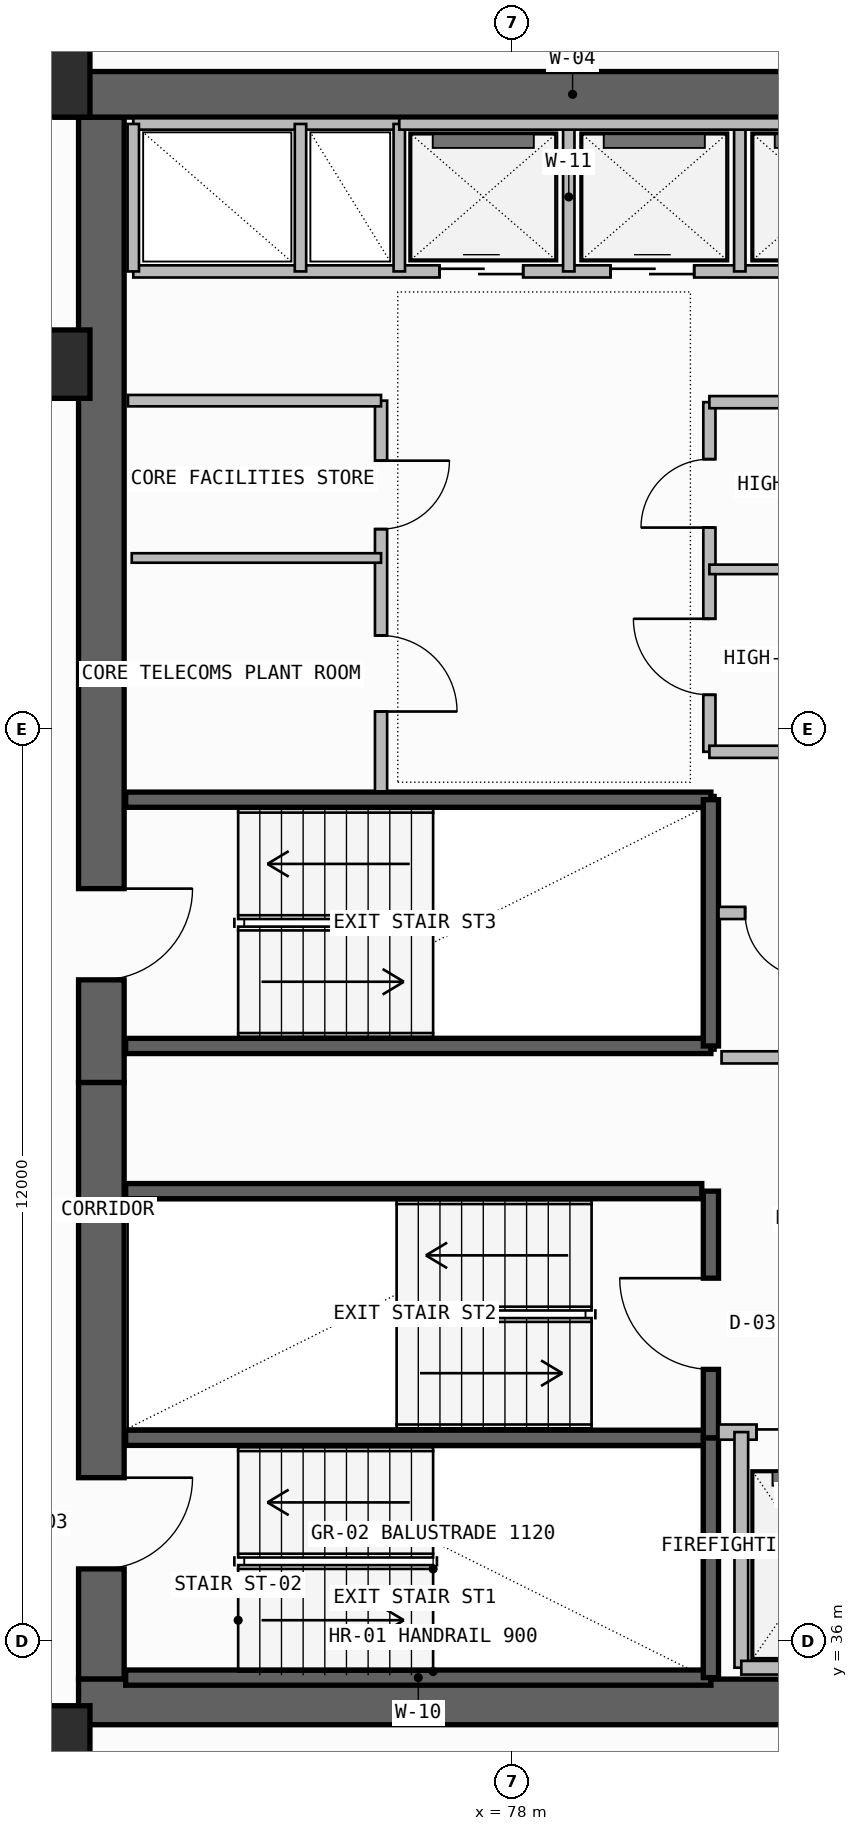
"""IFC4 building model, lengths in metres.
Left out: names, types, materials, properties, quantities, classifications, styles, units other than length and angle.
Written with IfcOpenShell. Run it as: python <this file> out.ifc"""

import sys

from ifc_helpers import new_model, si_unit, direction, frame, frame_2d, origin, origin_2d, place, context, subcontext, project, spatial, rectangle, extrude, element, fill, save


model = new_model("IFC4")
c1 = context("Model", 3, precision=1e-05, world=origin(), true_north=direction((0.0, 1.0)))
c2 = subcontext(c1, "Body", "Model", "MODEL_VIEW")
j1 = project(units=[si_unit("LENGTHUNIT", "METRE"), si_unit("PLANEANGLEUNIT", "RADIAN")], contexts=[c1])
p1 = place(None, origin())
s1 = spatial("IfcSite", under=j1, at=p1, CompositionType="ELEMENT")
p2 = place(p1, origin())
s2 = spatial("IfcBuilding", under=s1, at=p2, CompositionType="ELEMENT")
p3 = place(p2, frame((0.0, 0.0, 246.66)))
s3 = spatial("IfcBuildingStorey", under=s2, at=p3, CompositionType="ELEMENT", Elevation=246.66)
p4 = place(p3, frame((72.6, 35.5, -0.26), z_axis=(0.0, 0.0, 1.0), x_axis=(0.0, 1.0, 0.0)))
e1 = element("IfcWall", 1, at=p4, inside=s3, PredefinedType="SHEAR", context=c2, shape_type="SweptSolid", body=[
    extrude(rectangle(XDim=7.85, YDim=0.6, at=frame_2d((3.925, 0.0))), origin(), (0.0, 0.0, 1.0), 3.52),
])
p5 = place(p4, frame((1.45, 0.0, 0.26)))
e2 = element("IfcOpeningElement", 2, at=p5, cuts=e1, PredefinedType="OPENING", context=c2, shape_type="SweptSolid", body=[
    extrude(rectangle(XDim=1.2, YDim=2.2, at=frame_2d((0.6, 1.1))), frame((0.0, 0.31, 0.0), z_axis=(0.0, -1.0, 0.0), x_axis=(1.0, 0.0, 0.0)), (0.0, 0.0, 1.0), 0.62),
])
p6 = place(p3, frame((72.3, 35.2, -0.26), z_axis=(0.0, 0.0, 1.0), x_axis=(1.0, 0.0, 0.0)))
e3 = element("IfcWall", 3, at=p6, inside=s3, PredefinedType="SHEAR", context=c2, shape_type="SweptSolid", body=[
    extrude(rectangle(XDim=13.3, YDim=0.6, at=frame_2d((6.65, 0.0))), origin(), (0.0, 0.0, 1.0), 3.52),
])
p7 = place(p3, frame((72.6, 43.35, -0.26), z_axis=(0.0, 0.0, 1.0), x_axis=(0.0, 1.0, 0.0)))
e4 = element("IfcWall", 4, at=p7, inside=s3, PredefinedType="SHEAR", context=c2, shape_type="SweptSolid", body=[
    extrude(rectangle(XDim=12.7, YDim=0.6, at=frame_2d((6.35, 0.0))), origin(), (0.0, 0.0, 1.0), 3.52),
])
p8 = place(p7, frame((1.35, 0.0, 0.26)))
e5 = element("IfcOpeningElement", 5, at=p8, cuts=e4, PredefinedType="OPENING", context=c2, shape_type="SweptSolid", body=[
    extrude(rectangle(XDim=1.2, YDim=2.2, at=frame_2d((0.6, 1.1))), frame((0.0, 0.31, 0.0), z_axis=(0.0, -1.0, 0.0), x_axis=(1.0, 0.0, 0.0)), (0.0, 0.0, 1.0), 0.62),
])
p9 = place(p3, frame((72.0, 56.35, -0.26), z_axis=(0.0, 0.0, 1.0), x_axis=(1.0, 0.0, 0.0)))
e6 = element("IfcWall", 6, at=p9, inside=s3, PredefinedType="SHEAR", context=c2, shape_type="SweptSolid", body=[
    extrude(rectangle(XDim=13.6, YDim=0.6, at=frame_2d((6.8, 0.0))), origin(), (0.0, 0.0, 1.0), 3.52),
])
for number, where, z_axis, x_axis in (
    (7, (72.0, 34.7, 0.0), (0.0, 0.0, 1.0), (1.0, 0.0, 0.0)),
    (8, (72.0, 52.8, 0.0), (0.0, 0.0, 1.0), (1.0, 0.0, 0.0)),
    (9, (72.0, 56.5, 0.0), (0.0, 0.0, 1.0), (1.0, 0.0, 0.0)),
):
    element("IfcColumn", number, at=place(p3, frame(where, z_axis=z_axis, x_axis=x_axis)), inside=s3, PredefinedType="COLUMN", context=c2, shape_type="SweptSolid", body=[
        extrude(rectangle(XDim=0.9, YDim=0.9, at=origin_2d()), origin(), (0.0, 0.0, 1.0), 3.52),
    ])
for number, where, z_axis, x_axis in (
    (10, (72.92, 35.52, -0.26), (0.0, 0.0, 1.0), (1.0, 0.0, 0.0)),
    (11, (72.92, 38.675, -0.26), (0.0, 0.0, 1.0), (1.0, 0.0, 0.0)),
):
    element("IfcWall", number, at=place(p3, frame(where, z_axis=z_axis, x_axis=x_axis)), inside=s3, PredefinedType="SOLIDWALL", context=c2, shape_type="SweptSolid", body=[
        extrude(rectangle(XDim=7.7, YDim=0.2, at=frame_2d((3.85, 0.0))), origin(), (0.0, 0.0, 1.0), 3.52),
    ])
p10 = place(p3, frame((80.62, 35.52, -0.26), z_axis=(0.0, 0.0, 1.0), x_axis=(0.0, 1.0, 0.0)))
e12 = element("IfcWall", 12, at=p10, inside=s3, PredefinedType="SOLIDWALL", context=c2, shape_type="SweptSolid", body=[
    extrude(rectangle(XDim=3.155, YDim=0.2, at=frame_2d((1.578, 0.0))), origin(), (0.0, 0.0, 1.0), 3.52),
])
p11 = place(p3, frame((80.62, 38.675, -0.26), z_axis=(0.0, 0.0, 1.0), x_axis=(0.0, 1.0, 0.0)))
e13 = element("IfcWall", 13, at=p11, inside=s3, PredefinedType="SOLIDWALL", context=c2, shape_type="SweptSolid", body=[
    extrude(rectangle(XDim=3.245, YDim=0.2, at=frame_2d((1.623, 0.0))), origin(), (0.0, 0.0, 1.0), 3.52),
])
p12 = place(p11, frame((0.9, 0.0, 0.26)))
e14 = element("IfcOpeningElement", 14, at=p12, cuts=e13, PredefinedType="OPENING", context=c2, shape_type="SweptSolid", body=[
    extrude(rectangle(XDim=1.2, YDim=2.2, at=frame_2d((0.6, 1.1))), frame((0.0, 0.11, 0.0), z_axis=(0.0, -1.0, 0.0), x_axis=(1.0, 0.0, 0.0)), (0.0, 0.0, 1.0), 0.22),
])
p13 = place(p3, frame((80.72, 38.75, 0.0), z_axis=(0.0, 0.0, 1.0), x_axis=(1.0, 0.0, 0.0)))
e15 = element("IfcWall", 15, at=p13, inside=s3, PredefinedType="SOLIDWALL", context=c2, shape_type="SweptSolid", body=[
    extrude(rectangle(XDim=4.26, YDim=0.2, at=frame_2d((2.13, 0.0))), origin(), (0.0, 0.0, 1.0), 3.26),
])
p14 = place(p13, frame((0.5, 0.0, 0.0)))
e16 = element("IfcOpeningElement", 16, at=p14, cuts=e15, PredefinedType="OPENING", context=c2, shape_type="SweptSolid", body=[
    extrude(rectangle(XDim=1.3, YDim=2.3, at=frame_2d((0.65, 1.15))), frame((0.0, 0.11, 0.0), z_axis=(0.0, -1.0, 0.0), x_axis=(1.0, 0.0, 0.0)), (0.0, 0.0, 1.0), 0.22),
])
p15 = place(p13, frame((2.45, 0.0, 0.0)))
e17 = element("IfcOpeningElement", 17, at=p15, cuts=e15, PredefinedType="OPENING", context=c2, shape_type="SweptSolid", body=[
    extrude(rectangle(XDim=1.3, YDim=2.3, at=frame_2d((0.65, 1.15))), frame((0.0, 0.11, 0.0), z_axis=(0.0, -1.0, 0.0), x_axis=(1.0, 0.0, 0.0)), (0.0, 0.0, 1.0), 0.22),
])
p16 = place(p3, frame((81.02, 35.65, 0.0), z_axis=(0.0, 0.0, 1.0), x_axis=(0.0, 1.0, 0.0)))
e18 = element("IfcWall", 18, at=p16, inside=s3, PredefinedType="SOLIDWALL", context=c2, shape_type="SweptSolid", body=[
    extrude(rectangle(XDim=3.1, YDim=0.18, at=frame_2d((1.55, 0.0))), origin(), (0.0, 0.0, 1.0), 3.26),
])
p17 = place(p3, frame((81.02, 35.65, 0.0), z_axis=(0.0, 0.0, 1.0), x_axis=(1.0, 0.0, 0.0)))
e19 = element("IfcWall", 19, at=p17, inside=s3, PredefinedType="SOLIDWALL", context=c2, shape_type="SweptSolid", body=[
    extrude(rectangle(XDim=3.93, YDim=0.18, at=frame_2d((1.965, 0.0))), origin(), (0.0, 0.0, 1.0), 3.26),
])
p18 = place(p3, frame((72.92, 41.92, -0.26), z_axis=(0.0, 0.0, 1.0), x_axis=(1.0, 0.0, 0.0)))
e20 = element("IfcWall", 20, at=p18, inside=s3, PredefinedType="SOLIDWALL", context=c2, shape_type="SweptSolid", body=[
    extrude(rectangle(XDim=7.58, YDim=0.2, at=frame_2d((3.79, 0.0))), origin(), (0.0, 0.0, 1.0), 3.52),
])
for number, where, z_axis, x_axis in (
    (21, (72.92, 43.83, -0.26), (0.0, 0.0, 1.0), (1.0, 0.0, 0.0)),
    (22, (72.92, 47.07, -0.26), (0.0, 0.0, 1.0), (1.0, 0.0, 0.0)),
):
    element("IfcWall", number, at=place(p3, frame(where, z_axis=z_axis, x_axis=x_axis)), inside=s3, PredefinedType="SOLIDWALL", context=c2, shape_type="SweptSolid", body=[
        extrude(rectangle(XDim=7.7, YDim=0.2, at=frame_2d((3.85, 0.0))), origin(), (0.0, 0.0, 1.0), 3.52),
    ])
p19 = place(p3, frame((80.62, 43.83, -0.26), z_axis=(0.0, 0.0, 1.0), x_axis=(0.0, 1.0, 0.0)))
e23 = element("IfcWall", 23, at=p19, inside=s3, PredefinedType="SOLIDWALL", context=c2, shape_type="SweptSolid", body=[
    extrude(rectangle(XDim=3.24, YDim=0.2, at=frame_2d((1.62, 0.0))), origin(), (0.0, 0.0, 1.0), 3.52),
])
p20 = place(p3, frame((80.72, 45.58, 0.0), z_axis=(0.0, 0.0, 1.0), x_axis=(1.0, 0.0, 0.0)))
e24 = element("IfcWall", 24, at=p20, inside=s3, PredefinedType="PLUMBINGWALL", context=c2, shape_type="SweptSolid", body=[
    extrude(rectangle(XDim=4.23, YDim=0.16, at=frame_2d((2.115, 0.0))), origin(), (0.0, 0.0, 1.0), 3.26),
])
p21 = place(p20, frame((0.35, 0.0, 0.0)))
e25 = element("IfcOpeningElement", 25, at=p21, cuts=e24, PredefinedType="OPENING", context=c2, shape_type="SweptSolid", body=[
    extrude(rectangle(XDim=0.85, YDim=2.05, at=frame_2d((0.425, 1.025))), frame((0.0, 0.09, 0.0), z_axis=(0.0, -1.0, 0.0), x_axis=(1.0, 0.0, 0.0)), (0.0, 0.0, 1.0), 0.18),
])
p22 = place(p20, frame((2.35, 0.0, 0.0)))
e26 = element("IfcOpeningElement", 26, at=p22, cuts=e24, PredefinedType="OPENING", context=c2, shape_type="SweptSolid", body=[
    extrude(rectangle(XDim=0.9, YDim=2.1, at=frame_2d((0.45, 1.05))), frame((0.0, 0.09, 0.0), z_axis=(0.0, -1.0, 0.0), x_axis=(1.0, 0.0, 0.0)), (0.0, 0.0, 1.0), 0.18),
])
p23 = place(p3, frame((80.76, 43.68, 0.0), z_axis=(0.0, 0.0, 1.0), x_axis=(1.0, 0.0, 0.0)))
e27 = element("IfcWall", 27, at=p23, inside=s3, PredefinedType="PLUMBINGWALL", context=c2, shape_type="SweptSolid", body=[
    extrude(rectangle(XDim=4.19, YDim=0.16, at=frame_2d((2.095, 0.0))), origin(), (0.0, 0.0, 1.0), 3.26),
])
p24 = place(p3, frame((76.28, 47.18, 0.0), z_axis=(0.0, 0.0, 1.0), x_axis=(0.0, 1.0, 0.0)))
e28 = element("IfcWall", 28, at=p24, inside=s3, PredefinedType="SOLIDWALL", context=c2, shape_type="SweptSolid", body=[
    extrude(rectangle(XDim=5.14, YDim=0.16, at=frame_2d((2.57, 0.0))), origin(), (0.0, 0.0, 1.0), 3.26),
])
p25 = place(p24, frame((1.05, 0.0, 0.0)))
e29 = element("IfcOpeningElement", 29, at=p25, cuts=e28, PredefinedType="OPENING", context=c2, shape_type="SweptSolid", body=[
    extrude(rectangle(XDim=1.0, YDim=2.2, at=frame_2d((0.5, 1.1))), frame((0.0, 0.09, 0.0), z_axis=(0.0, -1.0, 0.0), x_axis=(1.0, 0.0, 0.0)), (0.0, 0.0, 1.0), 0.18),
])
p26 = place(p24, frame((3.45, 0.0, 0.0)))
e30 = element("IfcOpeningElement", 30, at=p26, cuts=e28, PredefinedType="OPENING", context=c2, shape_type="SweptSolid", body=[
    extrude(rectangle(XDim=0.9, YDim=2.1, at=frame_2d((0.45, 1.05))), frame((0.0, 0.09, 0.0), z_axis=(0.0, -1.0, 0.0), x_axis=(1.0, 0.0, 0.0)), (0.0, 0.0, 1.0), 0.18),
])
p27 = place(p3, frame((72.95, 52.32, 0.0), z_axis=(0.0, 0.0, 1.0), x_axis=(1.0, 0.0, 0.0)))
e31 = element("IfcWall", 31, at=p27, inside=s3, PredefinedType="SOLIDWALL", context=c2, shape_type="SweptSolid", body=[
    extrude(rectangle(XDim=3.33, YDim=0.15, at=frame_2d((1.665, 0.0))), origin(), (0.0, 0.0, 1.0), 3.26),
])
p28 = place(p3, frame((73.0, 50.25, 0.0), z_axis=(0.0, 0.0, 1.0), x_axis=(1.0, 0.0, 0.0)))
e32 = element("IfcWall", 32, at=p28, inside=s3, PredefinedType="PARTITIONING", context=c2, shape_type="SweptSolid", body=[
    extrude(rectangle(XDim=3.28, YDim=0.125, at=frame_2d((1.64, 0.0))), origin(), (0.0, 0.0, 1.0), 3.26),
])
p29 = place(p3, frame((80.6, 47.7, 0.0), z_axis=(0.0, 0.0, 1.0), x_axis=(0.0, 1.0, 0.0)))
e33 = element("IfcWall", 33, at=p29, inside=s3, PredefinedType="SOLIDWALL", context=c2, shape_type="SweptSolid", body=[
    extrude(rectangle(XDim=4.6, YDim=0.16, at=frame_2d((2.3, 0.0))), origin(), (0.0, 0.0, 1.0), 3.26),
])
p30 = place(p29, frame((0.75, 0.0, 0.0)))
e34 = element("IfcOpeningElement", 34, at=p30, cuts=e33, PredefinedType="OPENING", context=c2, shape_type="SweptSolid", body=[
    extrude(rectangle(XDim=1.0, YDim=2.2, at=frame_2d((0.5, 1.1))), frame((0.0, 0.09, 0.0), z_axis=(0.0, -1.0, 0.0), x_axis=(1.0, 0.0, 0.0)), (0.0, 0.0, 1.0), 0.18),
])
p31 = place(p29, frame((2.95, 0.0, 0.0)))
e35 = element("IfcOpeningElement", 35, at=p31, cuts=e33, PredefinedType="OPENING", context=c2, shape_type="SweptSolid", body=[
    extrude(rectangle(XDim=0.9, YDim=2.1, at=frame_2d((0.45, 1.05))), frame((0.0, 0.09, 0.0), z_axis=(0.0, -1.0, 0.0), x_axis=(1.0, 0.0, 0.0)), (0.0, 0.0, 1.0), 0.18),
])
p32 = place(p3, frame((80.6, 47.7, 0.0), z_axis=(0.0, 0.0, 1.0), x_axis=(1.0, 0.0, 0.0)))
e36 = element("IfcWall", 36, at=p32, inside=s3, PredefinedType="SOLIDWALL", context=c2, shape_type="SweptSolid", body=[
    extrude(rectangle(XDim=4.4, YDim=0.16, at=frame_2d((2.2, 0.0))), origin(), (0.0, 0.0, 1.0), 3.26),
])
p33 = place(p3, frame((80.6, 52.3, 0.0), z_axis=(0.0, 0.0, 1.0), x_axis=(1.0, 0.0, 0.0)))
e37 = element("IfcWall", 37, at=p33, inside=s3, PredefinedType="SOLIDWALL", context=c2, shape_type="SweptSolid", body=[
    extrude(rectangle(XDim=4.22, YDim=0.16, at=frame_2d((2.11, 0.0))), origin(), (0.0, 0.0, 1.0), 3.26),
])
p34 = place(p3, frame((80.6, 50.1, 0.0), z_axis=(0.0, 0.0, 1.0), x_axis=(1.0, 0.0, 0.0)))
e38 = element("IfcWall", 38, at=p34, inside=s3, PredefinedType="PARTITIONING", context=c2, shape_type="SweptSolid", body=[
    extrude(rectangle(XDim=4.22, YDim=0.125, at=frame_2d((2.11, 0.0))), origin(), (0.0, 0.0, 1.0), 3.26),
])
p35 = place(p3, frame((73.02, 54.02, 0.0), z_axis=(0.0, 0.0, 1.0), x_axis=(1.0, 0.0, 0.0)))
e39 = element("IfcWall", 39, at=p35, inside=s3, PredefinedType="SOLIDWALL", context=c2, shape_type="SweptSolid", body=[
    extrude(rectangle(XDim=12.08, YDim=0.16, at=frame_2d((6.04, 0.0))), origin(), (0.0, 0.0, 1.0), 3.26),
])
p36 = place(p35, frame((4.03, 0.0, 0.0)))
e40 = element("IfcOpeningElement", 40, at=p36, cuts=e39, PredefinedType="OPENING", context=c2, shape_type="SweptSolid", body=[
    extrude(rectangle(XDim=1.1, YDim=2.25, at=frame_2d((0.55, 1.125))), frame((0.0, 0.09, 0.0), z_axis=(0.0, -1.0, 0.0), x_axis=(1.0, 0.0, 0.0)), (0.0, 0.0, 1.0), 0.18),
])
p37 = place(p35, frame((6.28, 0.0, 0.0)))
e41 = element("IfcOpeningElement", 41, at=p37, cuts=e39, PredefinedType="OPENING", context=c2, shape_type="SweptSolid", body=[
    extrude(rectangle(XDim=1.1, YDim=2.25, at=frame_2d((0.55, 1.125))), frame((0.0, 0.09, 0.0), z_axis=(0.0, -1.0, 0.0), x_axis=(1.0, 0.0, 0.0)), (0.0, 0.0, 1.0), 0.18),
])
p38 = place(p35, frame((8.53, 0.0, 0.0)))
e42 = element("IfcOpeningElement", 42, at=p38, cuts=e39, PredefinedType="OPENING", context=c2, shape_type="SweptSolid", body=[
    extrude(rectangle(XDim=1.1, YDim=2.25, at=frame_2d((0.55, 1.125))), frame((0.0, 0.09, 0.0), z_axis=(0.0, -1.0, 0.0), x_axis=(1.0, 0.0, 0.0)), (0.0, 0.0, 1.0), 0.18),
])
p39 = place(p3, frame((73.02, 55.96, 0.0), z_axis=(0.0, 0.0, 1.0), x_axis=(1.0, 0.0, 0.0)))
e43 = element("IfcWall", 43, at=p39, inside=s3, PredefinedType="SOLIDWALL", context=c2, shape_type="SweptSolid", body=[
    extrude(rectangle(XDim=3.5, YDim=0.15, at=frame_2d((1.75, 0.0))), origin(), (0.0, 0.0, 1.0), 3.26),
])
p40 = place(p3, frame((73.02, 54.02, 0.0), z_axis=(0.0, 0.0, 1.0), x_axis=(0.0, 1.0, 0.0)))
e44 = element("IfcWall", 44, at=p40, inside=s3, PredefinedType="PLUMBINGWALL", context=c2, shape_type="SweptSolid", body=[
    extrude(rectangle(XDim=1.94, YDim=0.15, at=frame_2d((0.97, 0.0))), origin(), (0.0, 0.0, 1.0), 3.26),
])
p41 = place(p3, frame((76.52, 54.02, 0.0), z_axis=(0.0, 0.0, 1.0), x_axis=(0.0, 1.0, 0.0)))
e45 = element("IfcWall", 45, at=p41, inside=s3, PredefinedType="SOLIDWALL", context=c2, shape_type="SweptSolid", body=[
    extrude(rectangle(XDim=1.94, YDim=0.15, at=frame_2d((0.97, 0.0))), origin(), (0.0, 0.0, 1.0), 3.26),
])
p42 = place(p3, frame((75.22, 54.02, 0.0), z_axis=(0.0, 0.0, 1.0), x_axis=(0.0, 1.0, 0.0)))
e46 = element("IfcWall", 46, at=p42, inside=s3, PredefinedType="PLUMBINGWALL", context=c2, shape_type="SweptSolid", body=[
    extrude(rectangle(XDim=1.94, YDim=0.15, at=frame_2d((0.97, 0.0))), origin(), (0.0, 0.0, 1.0), 3.26),
])
for number, where, z_axis, x_axis in (
    (47, (78.75, 54.02, 0.0), (0.0, 0.0, 1.0), (0.0, 1.0, 0.0)),
    (48, (81.0, 54.02, 0.0), (0.0, 0.0, 1.0), (0.0, 1.0, 0.0)),
):
    element("IfcWall", number, at=place(p3, frame(where, z_axis=z_axis, x_axis=x_axis)), inside=s3, PredefinedType="PLUMBINGWALL", context=c2, shape_type="SweptSolid", body=[
        extrude(rectangle(XDim=1.96, YDim=0.15, at=frame_2d((0.98, 0.0))), origin(), (0.0, 0.0, 1.0), 3.26),
    ])
p43 = place(p3, frame((76.52, 55.96, 0.0), z_axis=(0.0, 0.0, 1.0), x_axis=(1.0, 0.0, 0.0)))
e49 = element("IfcWall", 49, at=p43, inside=s3, PredefinedType="SOLIDWALL", context=c2, shape_type="SweptSolid", body=[
    extrude(rectangle(XDim=6.7, YDim=0.15, at=frame_2d((3.35, 0.0))), origin(), (0.0, 0.0, 1.0), 3.26),
])
p44 = place(p5, frame((1.2, 0.0, 0.0), z_axis=(0.0, 0.0, 1.0), x_axis=(-1.0, 0.0, 0.0)))
e50 = element("IfcDoor", 50, at=p44, inside=s3, OperationType="SINGLE_SWING_LEFT", PredefinedType="USERDEFINED", context=c2, shape_type="SweptSolid", body=[
    extrude(rectangle(XDim=1.2, YDim=2.2, at=frame_2d((0.6, 1.1))), frame((0.0, 0.025, 0.0), z_axis=(0.0, -1.0, 0.0), x_axis=(1.0, 0.0, 0.0)), (0.0, 0.0, 1.0), 0.05),
])
fill(e2, e50)
p45 = place(p12, origin())
e51 = element("IfcDoor", 51, at=p45, inside=s3, OperationType="SINGLE_SWING_RIGHT", PredefinedType="USERDEFINED", context=c2, shape_type="SweptSolid", body=[
    extrude(rectangle(XDim=1.2, YDim=2.2, at=frame_2d((0.6, 1.1))), frame((0.0, 0.025, 0.0), z_axis=(0.0, -1.0, 0.0), x_axis=(1.0, 0.0, 0.0)), (0.0, 0.0, 1.0), 0.05),
])
fill(e14, e51)
p46 = place(p14, origin())
e52 = element("IfcDoor", 52, at=p46, inside=s3, OperationType="DOUBLE_DOOR_SLIDING", PredefinedType="DOOR", context=c2, shape_type="SweptSolid", body=[
    extrude(rectangle(XDim=1.3, YDim=2.3, at=frame_2d((0.65, 1.15))), frame((0.0, 0.025, 0.0), z_axis=(0.0, -1.0, 0.0), x_axis=(1.0, 0.0, 0.0)), (0.0, 0.0, 1.0), 0.05),
])
fill(e16, e52)
p47 = place(p8, frame((1.2, 0.0, 0.0), z_axis=(0.0, 0.0, 1.0), x_axis=(-1.0, 0.0, 0.0)))
e53 = element("IfcDoor", 53, at=p47, inside=s3, OperationType="SINGLE_SWING_LEFT", PredefinedType="USERDEFINED", context=c2, shape_type="SweptSolid", body=[
    extrude(rectangle(XDim=1.2, YDim=2.2, at=frame_2d((0.6, 1.1))), frame((0.0, 0.025, 0.0), z_axis=(0.0, -1.0, 0.0), x_axis=(1.0, 0.0, 0.0)), (0.0, 0.0, 1.0), 0.05),
])
fill(e5, e53)
p48 = place(p21, frame((0.85, 0.0, 0.0), z_axis=(0.0, 0.0, 1.0), x_axis=(-1.0, 0.0, 0.0)))
e54 = element("IfcDoor", 54, at=p48, inside=s3, OperationType="SINGLE_SWING_LEFT", PredefinedType="DOOR", context=c2, shape_type="SweptSolid", body=[
    extrude(rectangle(XDim=0.85, YDim=2.05, at=frame_2d((0.425, 1.025))), frame((0.0, 0.025, 0.0), z_axis=(0.0, -1.0, 0.0), x_axis=(1.0, 0.0, 0.0)), (0.0, 0.0, 1.0), 0.05),
])
fill(e25, e54)
p49 = place(p25, frame((1.0, 0.0, 0.0), z_axis=(0.0, 0.0, 1.0), x_axis=(-1.0, 0.0, 0.0)))
e55 = element("IfcDoor", 55, at=p49, inside=s3, OperationType="SINGLE_SWING_RIGHT", PredefinedType="DOOR", context=c2, shape_type="SweptSolid", body=[
    extrude(rectangle(XDim=1.0, YDim=2.2, at=frame_2d((0.5, 1.1))), frame((0.0, 0.025, 0.0), z_axis=(0.0, -1.0, 0.0), x_axis=(1.0, 0.0, 0.0)), (0.0, 0.0, 1.0), 0.05),
])
fill(e29, e55)
p50 = place(p26, frame((0.9, 0.0, 0.0), z_axis=(0.0, 0.0, 1.0), x_axis=(-1.0, 0.0, 0.0)))
e56 = element("IfcDoor", 56, at=p50, inside=s3, OperationType="SINGLE_SWING_LEFT", PredefinedType="DOOR", context=c2, shape_type="SweptSolid", body=[
    extrude(rectangle(XDim=0.9, YDim=2.1, at=frame_2d((0.45, 1.05))), frame((0.0, 0.025, 0.0), z_axis=(0.0, -1.0, 0.0), x_axis=(1.0, 0.0, 0.0)), (0.0, 0.0, 1.0), 0.05),
])
fill(e30, e56)
p51 = place(p30, origin())
e57 = element("IfcDoor", 57, at=p51, inside=s3, OperationType="SINGLE_SWING_RIGHT", PredefinedType="DOOR", context=c2, shape_type="SweptSolid", body=[
    extrude(rectangle(XDim=1.0, YDim=2.2, at=frame_2d((0.5, 1.1))), frame((0.0, 0.025, 0.0), z_axis=(0.0, -1.0, 0.0), x_axis=(1.0, 0.0, 0.0)), (0.0, 0.0, 1.0), 0.05),
])
fill(e34, e57)
p52 = place(p31, origin())
e58 = element("IfcDoor", 58, at=p52, inside=s3, OperationType="SINGLE_SWING_LEFT", PredefinedType="DOOR", context=c2, shape_type="SweptSolid", body=[
    extrude(rectangle(XDim=0.9, YDim=2.1, at=frame_2d((0.45, 1.05))), frame((0.0, 0.025, 0.0), z_axis=(0.0, -1.0, 0.0), x_axis=(1.0, 0.0, 0.0)), (0.0, 0.0, 1.0), 0.05),
])
fill(e35, e58)
p53 = place(p36, origin())
e59 = element("IfcDoor", 59, at=p53, inside=s3, OperationType="DOUBLE_DOOR_SLIDING", PredefinedType="DOOR", context=c2, shape_type="SweptSolid", body=[
    extrude(rectangle(XDim=1.1, YDim=2.25, at=frame_2d((0.55, 1.125))), frame((0.0, 0.025, 0.0), z_axis=(0.0, -1.0, 0.0), x_axis=(1.0, 0.0, 0.0)), (0.0, 0.0, 1.0), 0.05),
])
fill(e40, e59)
p54 = place(p37, origin())
e60 = element("IfcDoor", 60, at=p54, inside=s3, OperationType="DOUBLE_DOOR_SLIDING", PredefinedType="DOOR", context=c2, shape_type="SweptSolid", body=[
    extrude(rectangle(XDim=1.1, YDim=2.25, at=frame_2d((0.55, 1.125))), frame((0.0, 0.025, 0.0), z_axis=(0.0, -1.0, 0.0), x_axis=(1.0, 0.0, 0.0)), (0.0, 0.0, 1.0), 0.05),
])
fill(e41, e60)
save(model, sys.argv[1])
